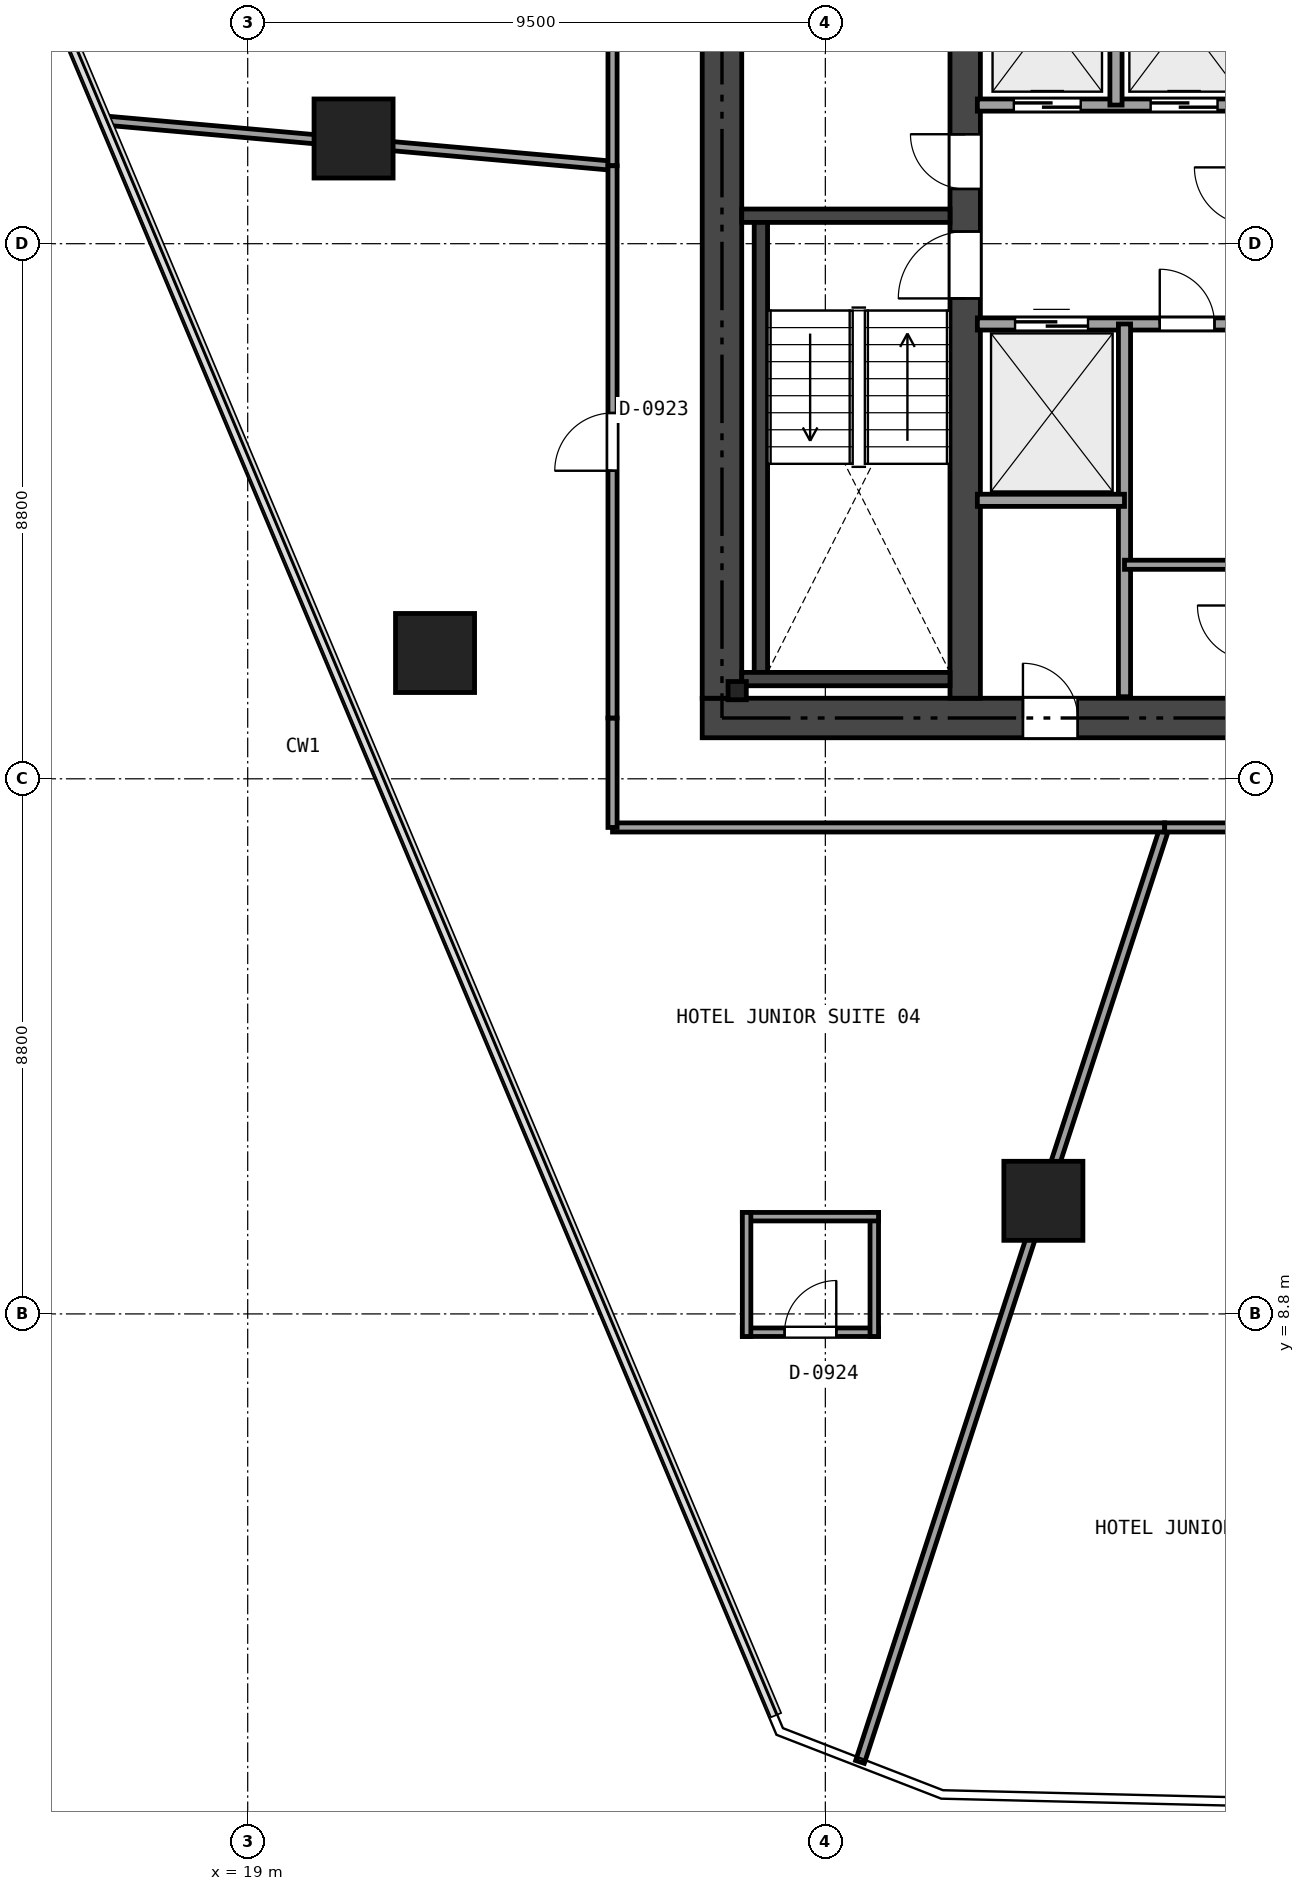
"""IFC4 building model, lengths in metres.
Left out: names, types, materials, properties, quantities, classifications, styles, units other than length and angle.
Written with IfcOpenShell. Run it as: python <this file> out.ifc"""

import sys

from ifc_helpers import new_model, si_unit, direction, frame, frame_2d, origin, origin_2d, place, context, subcontext, project, spatial, rectangle, i_section, extrude, element, fill, save


model = new_model("IFC4")
c1 = context("Model", 3, precision=1e-05, world=origin(), true_north=direction((0.0, 1.0)))
c2 = subcontext(c1, "Body", "Model", "MODEL_VIEW")
j1 = project(units=[si_unit("LENGTHUNIT", "METRE"), si_unit("PLANEANGLEUNIT", "RADIAN")], contexts=[c1])
p1 = place(None, origin())
s1 = spatial("IfcSite", under=j1, at=p1, CompositionType="ELEMENT")
p2 = place(p1, origin())
s2 = spatial("IfcBuilding", under=s1, at=p2, CompositionType="ELEMENT")
p3 = place(p2, frame((0.0, 0.0, 40.8)))
s3 = spatial("IfcBuildingStorey", under=s2, at=p3, CompositionType="ELEMENT", Elevation=40.8)
p4 = place(p3, frame((26.475, 18.6, 0.0), z_axis=(0.0, 0.0, 1.0), x_axis=(1.0, 0.0, 0.0)))
e1 = element("IfcWall", 1, at=p4, inside=s3, PredefinedType="SHEAR", context=c2, shape_type="SweptSolid", body=[
    extrude(rectangle(XDim=21.45, YDim=0.65, at=frame_2d((10.725, 0.0))), origin(), (0.0, 0.0, 1.0), 3.17),
])
p5 = place(p4, frame((12.45, 0.0, 0.0)))
e2 = element("IfcOpeningElement", 2, at=p5, cuts=e1, PredefinedType="OPENING", context=c2, shape_type="SweptSolid", body=[
    extrude(rectangle(XDim=1.15, YDim=2.15, at=frame_2d((0.575, 1.075))), frame((0.0, 0.335, 0.0), z_axis=(0.0, -1.0, 0.0), x_axis=(1.0, 0.0, 0.0)), (0.0, 0.0, 1.0), 0.67),
])
p6 = place(p4, frame((5.275, 0.0, 0.0)))
e3 = element("IfcOpeningElement", 3, at=p6, cuts=e1, PredefinedType="OPENING", context=c2, shape_type="SweptSolid", body=[
    extrude(rectangle(XDim=0.9, YDim=2.1, at=frame_2d((0.45, 1.05))), frame((0.0, 0.335, 0.0), z_axis=(0.0, -1.0, 0.0), x_axis=(1.0, 0.0, 0.0)), (0.0, 0.0, 1.0), 0.67),
])
p7 = place(p3, frame((26.8, 18.925, 0.0), z_axis=(0.0, 0.0, 1.0), x_axis=(0.0, 1.0, 0.0)))
e4 = element("IfcWall", 4, at=p7, inside=s3, PredefinedType="SHEAR", context=c2, shape_type="SweptSolid", body=[
    extrude(rectangle(XDim=14.95, YDim=0.65, at=frame_2d((7.475, 0.0))), origin(), (0.0, 0.0, 1.0), 3.17),
])
p8 = place(p3, frame((30.8, 18.925, 0.0), z_axis=(0.0, 0.0, 1.0), x_axis=(0.0, 1.0, 0.0)))
e5 = element("IfcWall", 5, at=p8, inside=s3, PredefinedType="SHEAR", context=c2, shape_type="SweptSolid", body=[
    extrude(rectangle(XDim=14.95, YDim=0.5, at=frame_2d((7.475, 0.0))), origin(), (0.0, 0.0, 1.0), 3.17),
])
p9 = place(p8, frame((6.575, 0.0, 0.0)))
e6 = element("IfcOpeningElement", 6, at=p9, cuts=e5, PredefinedType="OPENING", context=c2, shape_type="SweptSolid", body=[
    extrude(rectangle(XDim=1.1, YDim=2.15, at=frame_2d((0.55, 1.075))), frame((0.0, 0.26, 0.0), z_axis=(0.0, -1.0, 0.0), x_axis=(1.0, 0.0, 0.0)), (0.0, 0.0, 1.0), 0.52),
])
p10 = place(p8, frame((8.375, 0.0, 0.0)))
e7 = element("IfcOpeningElement", 7, at=p10, cuts=e5, PredefinedType="OPENING", context=c2, shape_type="SweptSolid", body=[
    extrude(rectangle(XDim=0.9, YDim=2.1, at=frame_2d((0.45, 1.05))), frame((0.0, 0.26, 0.0), z_axis=(0.0, -1.0, 0.0), x_axis=(1.0, 0.0, 0.0)), (0.0, 0.0, 1.0), 0.52),
])
p11 = place(p3, frame((27.125, 26.86, 0.0), z_axis=(0.0, 0.0, 1.0), x_axis=(1.0, 0.0, 0.0)))
e8 = element("IfcWall", 8, at=p11, inside=s3, PredefinedType="SHEAR", context=c2, shape_type="SweptSolid", body=[
    extrude(rectangle(XDim=3.425, YDim=0.22, at=frame_2d((1.712, 0.0))), origin(), (0.0, 0.0, 1.0), 3.17),
])
p12 = place(p3, frame((27.44, 19.35, 0.0), z_axis=(0.0, 0.0, 1.0), x_axis=(0.0, 1.0, 0.0)))
e9 = element("IfcWall", 9, at=p12, inside=s3, PredefinedType="SHEAR", context=c2, shape_type="SweptSolid", body=[
    extrude(rectangle(XDim=7.4, YDim=0.22, at=frame_2d((3.7, 0.0))), origin(), (0.0, 0.0, 1.0), 3.17),
])
p13 = place(p3, frame((27.125, 19.24, 0.0), z_axis=(0.0, 0.0, 1.0), x_axis=(1.0, 0.0, 0.0)))
e10 = element("IfcWall", 10, at=p13, inside=s3, PredefinedType="SHEAR", context=c2, shape_type="SweptSolid", body=[
    extrude(rectangle(XDim=3.425, YDim=0.22, at=frame_2d((1.712, 0.0))), origin(), (0.0, 0.0, 1.0), 3.17),
])
for number, where, z_axis, x_axis in (
    (11, (20.741, 28.13, 0.0), (0.0, 0.0, 1.0), (1.0, 0.0, 0.0)),
    (12, (22.081, 19.669, 0.0), (0.0, 0.0, 1.0), (1.0, 0.0, 0.0)),
    (13, (32.086, 10.66, 0.0), (0.0, 0.0, 1.0), (1.0, 0.0, 0.0)),
):
    element("IfcColumn", number, at=place(p3, frame(where, z_axis=z_axis, x_axis=x_axis)), inside=s3, PredefinedType="COLUMN", context=c2, shape_type="SweptSolid", body=[
        extrude(rectangle(XDim=1.3, YDim=1.3, at=origin_2d()), origin(), (0.0, 0.0, 1.0), 3.17),
    ])
p14 = place(p3, frame((27.05, 19.05, 0.0), z_axis=(0.0, 0.0, 1.0), x_axis=(1.0, 0.0, 0.0)))
e14 = element("IfcColumn", 14, at=p14, inside=s3, PredefinedType="PILASTER", context=c2, shape_type="SweptSolid", body=[
    extrude(i_section(OverallWidth=0.3, OverallDepth=0.3, WebThickness=0.011, FlangeThickness=0.019, at=origin_2d()), origin(), (0.0, 0.0, 1.0), 3.17),
])
p15 = place(p3, frame((31.0, 28.68, 0.0), z_axis=(0.0, 0.0, 1.0), x_axis=(1.0, 0.0, 0.0)))
e15 = element("IfcWall", 15, at=p15, inside=s3, PredefinedType="SOLIDWALL", context=c2, shape_type="SweptSolid", body=[
    extrude(rectangle(XDim=4.42, YDim=0.2, at=frame_2d((2.21, 0.0))), origin(), (0.0, 0.0, 1.0), 3.17),
])
p16 = place(p15, frame((0.6, 0.0, 0.0)))
e16 = element("IfcOpeningElement", 16, at=p16, cuts=e15, PredefinedType="OPENING", context=c2, shape_type="SweptSolid", body=[
    extrude(rectangle(XDim=1.1, YDim=2.15, at=frame_2d((0.55, 1.075))), frame((0.0, 0.11, 0.0), z_axis=(0.0, -1.0, 0.0), x_axis=(1.0, 0.0, 0.0)), (0.0, 0.0, 1.0), 0.22),
])
p17 = place(p15, frame((2.85, 0.0, 0.0)))
e17 = element("IfcOpeningElement", 17, at=p17, cuts=e15, PredefinedType="OPENING", context=c2, shape_type="SweptSolid", body=[
    extrude(rectangle(XDim=1.1, YDim=2.15, at=frame_2d((0.55, 1.075))), frame((0.0, 0.11, 0.0), z_axis=(0.0, -1.0, 0.0), x_axis=(1.0, 0.0, 0.0)), (0.0, 0.0, 1.0), 0.22),
])
p18 = place(p3, frame((33.28, 28.68, 0.0), z_axis=(0.0, 0.0, 1.0), x_axis=(0.0, 1.0, 0.0)))
e18 = element("IfcWall", 18, at=p18, inside=s3, PredefinedType="SOLIDWALL", context=c2, shape_type="SweptSolid", body=[
    extrude(rectangle(XDim=2.82, YDim=0.2, at=frame_2d((1.41, 0.0))), origin(), (0.0, 0.0, 1.0), 3.17),
])
p19 = place(p3, frame((31.0, 25.08, 0.0), z_axis=(0.0, 0.0, 1.0), x_axis=(1.0, 0.0, 0.0)))
e19 = element("IfcWall", 19, at=p19, inside=s3, PredefinedType="SOLIDWALL", context=c2, shape_type="SweptSolid", body=[
    extrude(rectangle(XDim=4.42, YDim=0.2, at=frame_2d((2.21, 0.0))), origin(), (0.0, 0.0, 1.0), 3.17),
])
p20 = place(p19, frame((3.0, 0.0, 0.0)))
e20 = element("IfcOpeningElement", 20, at=p20, cuts=e19, PredefinedType="OPENING", context=c2, shape_type="SweptSolid", body=[
    extrude(rectangle(XDim=0.9, YDim=2.1, at=frame_2d((0.45, 1.05))), frame((0.0, 0.11, 0.0), z_axis=(0.0, -1.0, 0.0), x_axis=(1.0, 0.0, 0.0)), (0.0, 0.0, 1.0), 0.22),
])
p21 = place(p19, frame((0.62, 0.0, 0.0)))
e21 = element("IfcOpeningElement", 21, at=p21, cuts=e19, PredefinedType="OPENING", context=c2, shape_type="SweptSolid", body=[
    extrude(rectangle(XDim=1.2, YDim=2.15, at=frame_2d((0.6, 1.075))), frame((0.0, 0.11, 0.0), z_axis=(0.0, -1.0, 0.0), x_axis=(1.0, 0.0, 0.0)), (0.0, 0.0, 1.0), 0.22),
])
p22 = place(p3, frame((33.42, 18.95, 0.0), z_axis=(0.0, 0.0, 1.0), x_axis=(0.0, 1.0, 0.0)))
e22 = element("IfcWall", 22, at=p22, inside=s3, PredefinedType="SOLIDWALL", context=c2, shape_type="SweptSolid", body=[
    extrude(rectangle(XDim=6.13, YDim=0.2, at=frame_2d((3.065, 0.0))), origin(), (0.0, 0.0, 1.0), 2.691),
])
p23 = place(p3, frame((31.0, 22.18, 0.0), z_axis=(0.0, 0.0, 1.0), x_axis=(1.0, 0.0, 0.0)))
e23 = element("IfcWall", 23, at=p23, inside=s3, PredefinedType="SOLIDWALL", context=c2, shape_type="SweptSolid", body=[
    extrude(rectangle(XDim=2.42, YDim=0.2, at=frame_2d((1.21, 0.0))), origin(), (0.0, 0.0, 1.0), 3.17),
])
p24 = place(p3, frame((33.42, 21.12, 0.0), z_axis=(0.0, 0.0, 1.0), x_axis=(1.0, 0.0, 0.0)))
e24 = element("IfcWall", 24, at=p24, inside=s3, PredefinedType="PARTITIONING", context=c2, shape_type="SweptSolid", body=[
    extrude(rectangle(XDim=2.0, YDim=0.15, at=frame_2d((1.0, 0.0))), origin(), (0.0, 0.0, 1.0), 3.17),
])
p25 = place(p3, frame((27.135, 8.499, 0.0), z_axis=(0.0, 0.0, 1.0), x_axis=(1.0, 0.0, 0.0)))
e25 = element("IfcWall", 25, at=p25, inside=s3, PredefinedType="PARTITIONING", context=c2, shape_type="SweptSolid", body=[
    extrude(rectangle(XDim=2.24, YDim=0.14, at=frame_2d((1.12, 0.0))), origin(), (0.0, 0.0, 1.0), 3.17),
])
p26 = place(p25, frame((0.695, 0.0, 0.0)))
e26 = element("IfcOpeningElement", 26, at=p26, cuts=e25, PredefinedType="OPENING", context=c2, shape_type="SweptSolid", body=[
    extrude(rectangle(XDim=0.85, YDim=2.1, at=frame_2d((0.425, 1.05))), frame((0.0, 0.08, 0.0), z_axis=(0.0, -1.0, 0.0), x_axis=(1.0, 0.0, 0.0)), (0.0, 0.0, 1.0), 0.16),
])
p27 = place(p3, frame((29.305, 8.429, 0.0), z_axis=(0.0, 0.0, 1.0), x_axis=(0.0, 1.0, 0.0)))
e27 = element("IfcWall", 27, at=p27, inside=s3, PredefinedType="PARTITIONING", context=c2, shape_type="SweptSolid", body=[
    extrude(rectangle(XDim=2.04, YDim=0.14, at=frame_2d((1.02, 0.0))), origin(), (0.0, 0.0, 1.0), 3.17),
])
p28 = place(p3, frame((29.375, 10.399, 0.0), z_axis=(0.0, 0.0, 1.0), x_axis=(-1.0, 0.0, 0.0)))
e28 = element("IfcWall", 28, at=p28, inside=s3, PredefinedType="PARTITIONING", context=c2, shape_type="SweptSolid", body=[
    extrude(rectangle(XDim=2.24, YDim=0.14, at=frame_2d((1.12, 0.0))), origin(), (0.0, 0.0, 1.0), 3.17),
])
p29 = place(p3, frame((27.205, 10.469, 0.0), z_axis=(0.0, 0.0, 1.0), x_axis=(0.0, -1.0, 0.0)))
e29 = element("IfcWall", 29, at=p29, inside=s3, PredefinedType="PARTITIONING", context=c2, shape_type="SweptSolid", body=[
    extrude(rectangle(XDim=2.04, YDim=0.14, at=frame_2d((1.02, 0.0))), origin(), (0.0, 0.0, 1.0), 3.17),
])
p30 = place(p3, frame((16.612, 28.429, 0.0), z_axis=(0.0, 0.0, 1.0), x_axis=(0.99605717102, -0.088713652045, 0.0)))
e30 = element("IfcWall", 30, at=p30, inside=s3, PredefinedType="PARTITIONING", context=c2, shape_type="SweptSolid", body=[
    extrude(rectangle(XDim=8.421, YDim=0.15, at=frame_2d((4.21, 0.0))), origin(), (0.0, 0.0, 1.0), 2.395),
])
p31 = place(p3, frame((25.0, 27.682, 0.0), z_axis=(0.0, 0.0, 1.0), x_axis=(0.0, 1.0, 0.0)))
e31 = element("IfcWall", 31, at=p31, inside=s3, PredefinedType="PARTITIONING", context=c2, shape_type="SweptSolid", body=[
    extrude(rectangle(XDim=8.318, YDim=0.15, at=frame_2d((4.159, 0.0))), origin(), (0.0, 0.0, 1.0), 2.355),
])
p32 = place(p31, frame((3.684, 0.0, 0.0)))
e32 = element("IfcOpeningElement", 32, at=p32, cuts=e31, PredefinedType="OPENING", context=c2, shape_type="SweptSolid", body=[
    extrude(rectangle(XDim=0.95, YDim=2.15, at=frame_2d((0.475, 1.075))), frame((0.0, 0.085, 0.0), z_axis=(0.0, -1.0, 0.0), x_axis=(1.0, 0.0, 0.0)), (0.0, 0.0, 1.0), 0.17),
])
p33 = place(p3, frame((29.07, 1.432, 0.0), z_axis=(0.0, 0.0, 1.0), x_axis=(0.309999825154, 0.950736613582, 0.0)))
e33 = element("IfcWall", 33, at=p33, inside=s3, PredefinedType="PARTITIONING", context=c2, shape_type="SweptSolid", body=[
    extrude(rectangle(XDim=16.165, YDim=0.15, at=frame_2d((8.082, 0.0))), origin(), (0.0, 0.0, 1.0), 2.395),
])
p34 = place(p3, frame((34.081, 16.8, 0.0), z_axis=(0.0, 0.0, 1.0), x_axis=(-1.0, 0.0, 0.0)))
e34 = element("IfcWall", 34, at=p34, inside=s3, PredefinedType="PARTITIONING", context=c2, shape_type="SweptSolid", body=[
    extrude(rectangle(XDim=9.081, YDim=0.15, at=frame_2d((4.541, 0.0))), origin(), (0.0, 0.0, 1.0), 2.355),
])
p35 = place(p3, frame((25.0, 16.8, 0.0), z_axis=(0.0, 0.0, 1.0), x_axis=(0.0, 1.0, 0.0)))
e35 = element("IfcWall", 35, at=p35, inside=s3, PredefinedType="PARTITIONING", context=c2, shape_type="SweptSolid", body=[
    extrude(rectangle(XDim=1.8, YDim=0.15, at=frame_2d((0.9, 0.0))), origin(), (0.0, 0.0, 1.0), 2.355),
])
p36 = place(p3, frame((25.0, 18.6, 0.0), z_axis=(0.0, 0.0, 1.0), x_axis=(0.0, 1.0, 0.0)))
e36 = element("IfcWall", 36, at=p36, inside=s3, PredefinedType="PARTITIONING", context=c2, shape_type="SweptSolid", body=[
    extrude(rectangle(XDim=9.082, YDim=0.15, at=frame_2d((4.541, 0.0))), origin(), (0.0, 0.0, 1.0), 2.395),
])
p37 = place(p36, frame((4.066, 0.0, 0.0)))
e37 = element("IfcOpeningElement", 37, at=p37, cuts=e36, PredefinedType="OPENING", context=c2, shape_type="SweptSolid", body=[
    extrude(rectangle(XDim=0.95, YDim=2.15, at=frame_2d((0.475, 1.075))), frame((0.0, 0.085, 0.0), z_axis=(0.0, -1.0, 0.0), x_axis=(1.0, 0.0, 0.0)), (0.0, 0.0, 1.0), 0.17),
])
p38 = place(p3, frame((41.079, 16.8, 0.0), z_axis=(0.0, 0.0, 1.0), x_axis=(-1.0, 0.0, 0.0)))
e38 = element("IfcWall", 38, at=p38, inside=s3, PredefinedType="PARTITIONING", context=c2, shape_type="SweptSolid", body=[
    extrude(rectangle(XDim=6.998, YDim=0.15, at=frame_2d((3.499, 0.0))), origin(), (0.0, 0.0, 1.0), 2.395),
])
p39 = place(p38, frame((3.024, 0.0, 0.0)))
e39 = element("IfcOpeningElement", 39, at=p39, cuts=e38, PredefinedType="OPENING", context=c2, shape_type="SweptSolid", body=[
    extrude(rectangle(XDim=0.95, YDim=2.15, at=frame_2d((0.475, 1.075))), frame((0.0, 0.085, 0.0), z_axis=(0.0, -1.0, 0.0), x_axis=(1.0, 0.0, 0.0)), (0.0, 0.0, 1.0), 0.17),
])
p40 = place(p9, origin())
e40 = element("IfcDoor", 40, at=p40, inside=s3, OperationType="SINGLE_SWING_LEFT", PredefinedType="DOOR", context=c2, shape_type="SweptSolid", body=[
    extrude(rectangle(XDim=1.1, YDim=2.15, at=frame_2d((0.55, 1.075))), frame((0.0, 0.025, 0.0), z_axis=(0.0, -1.0, 0.0), x_axis=(1.0, 0.0, 0.0)), (0.0, 0.0, 1.0), 0.05),
])
fill(e6, e40)
p41 = place(p10, origin())
e41 = element("IfcDoor", 41, at=p41, inside=s3, OperationType="SINGLE_SWING_RIGHT", PredefinedType="DOOR", context=c2, shape_type="SweptSolid", body=[
    extrude(rectangle(XDim=0.9, YDim=2.1, at=frame_2d((0.45, 1.05))), frame((0.0, 0.025, 0.0), z_axis=(0.0, -1.0, 0.0), x_axis=(1.0, 0.0, 0.0)), (0.0, 0.0, 1.0), 0.05),
])
fill(e7, e41)
p42 = place(p6, origin())
e42 = element("IfcDoor", 42, at=p42, inside=s3, OperationType="SINGLE_SWING_LEFT", PredefinedType="DOOR", context=c2, shape_type="SweptSolid", body=[
    extrude(rectangle(XDim=0.9, YDim=2.1, at=frame_2d((0.45, 1.05))), frame((0.0, 0.025, 0.0), z_axis=(0.0, -1.0, 0.0), x_axis=(1.0, 0.0, 0.0)), (0.0, 0.0, 1.0), 0.05),
])
fill(e3, e42)
p43 = place(p20, origin())
e43 = element("IfcDoor", 43, at=p43, inside=s3, OperationType="SINGLE_SWING_LEFT", PredefinedType="DOOR", context=c2, shape_type="SweptSolid", body=[
    extrude(rectangle(XDim=0.9, YDim=2.1, at=frame_2d((0.45, 1.05))), frame((0.0, 0.025, 0.0), z_axis=(0.0, -1.0, 0.0), x_axis=(1.0, 0.0, 0.0)), (0.0, 0.0, 1.0), 0.05),
])
fill(e20, e43)
p44 = place(p16, origin())
e44 = element("IfcDoor", 44, at=p44, inside=s3, OperationType="SLIDING_TO_LEFT", PredefinedType="DOOR", context=c2, shape_type="SweptSolid", body=[
    extrude(rectangle(XDim=1.1, YDim=2.15, at=frame_2d((0.55, 1.075))), frame((0.0, 0.025, 0.0), z_axis=(0.0, -1.0, 0.0), x_axis=(1.0, 0.0, 0.0)), (0.0, 0.0, 1.0), 0.05),
])
fill(e16, e44)
p45 = place(p17, origin())
e45 = element("IfcDoor", 45, at=p45, inside=s3, OperationType="SLIDING_TO_LEFT", PredefinedType="DOOR", context=c2, shape_type="SweptSolid", body=[
    extrude(rectangle(XDim=1.1, YDim=2.15, at=frame_2d((0.55, 1.075))), frame((0.0, 0.025, 0.0), z_axis=(0.0, -1.0, 0.0), x_axis=(1.0, 0.0, 0.0)), (0.0, 0.0, 1.0), 0.05),
])
fill(e17, e45)
p46 = place(p21, origin())
e46 = element("IfcDoor", 46, at=p46, inside=s3, OperationType="SLIDING_TO_LEFT", PredefinedType="DOOR", context=c2, shape_type="SweptSolid", body=[
    extrude(rectangle(XDim=1.2, YDim=2.15, at=frame_2d((0.6, 1.075))), frame((0.0, 0.025, 0.0), z_axis=(0.0, -1.0, 0.0), x_axis=(1.0, 0.0, 0.0)), (0.0, 0.0, 1.0), 0.05),
])
fill(e21, e46)
p47 = place(p37, origin())
e47 = element("IfcDoor", 47, at=p47, inside=s3, OperationType="SINGLE_SWING_LEFT", PredefinedType="DOOR", context=c2, shape_type="SweptSolid", body=[
    extrude(rectangle(XDim=0.95, YDim=2.15, at=frame_2d((0.475, 1.075))), frame((0.0, 0.025, 0.0), z_axis=(0.0, -1.0, 0.0), x_axis=(1.0, 0.0, 0.0)), (0.0, 0.0, 1.0), 0.05),
])
fill(e37, e47)
p48 = place(p26, origin())
e48 = element("IfcDoor", 48, at=p48, inside=s3, OperationType="SINGLE_SWING_RIGHT", PredefinedType="DOOR", context=c2, shape_type="SweptSolid", body=[
    extrude(rectangle(XDim=0.85, YDim=2.1, at=frame_2d((0.425, 1.05))), frame((0.0, 0.025, 0.0), z_axis=(0.0, -1.0, 0.0), x_axis=(1.0, 0.0, 0.0)), (0.0, 0.0, 1.0), 0.05),
])
fill(e26, e48)
save(model, sys.argv[1])
